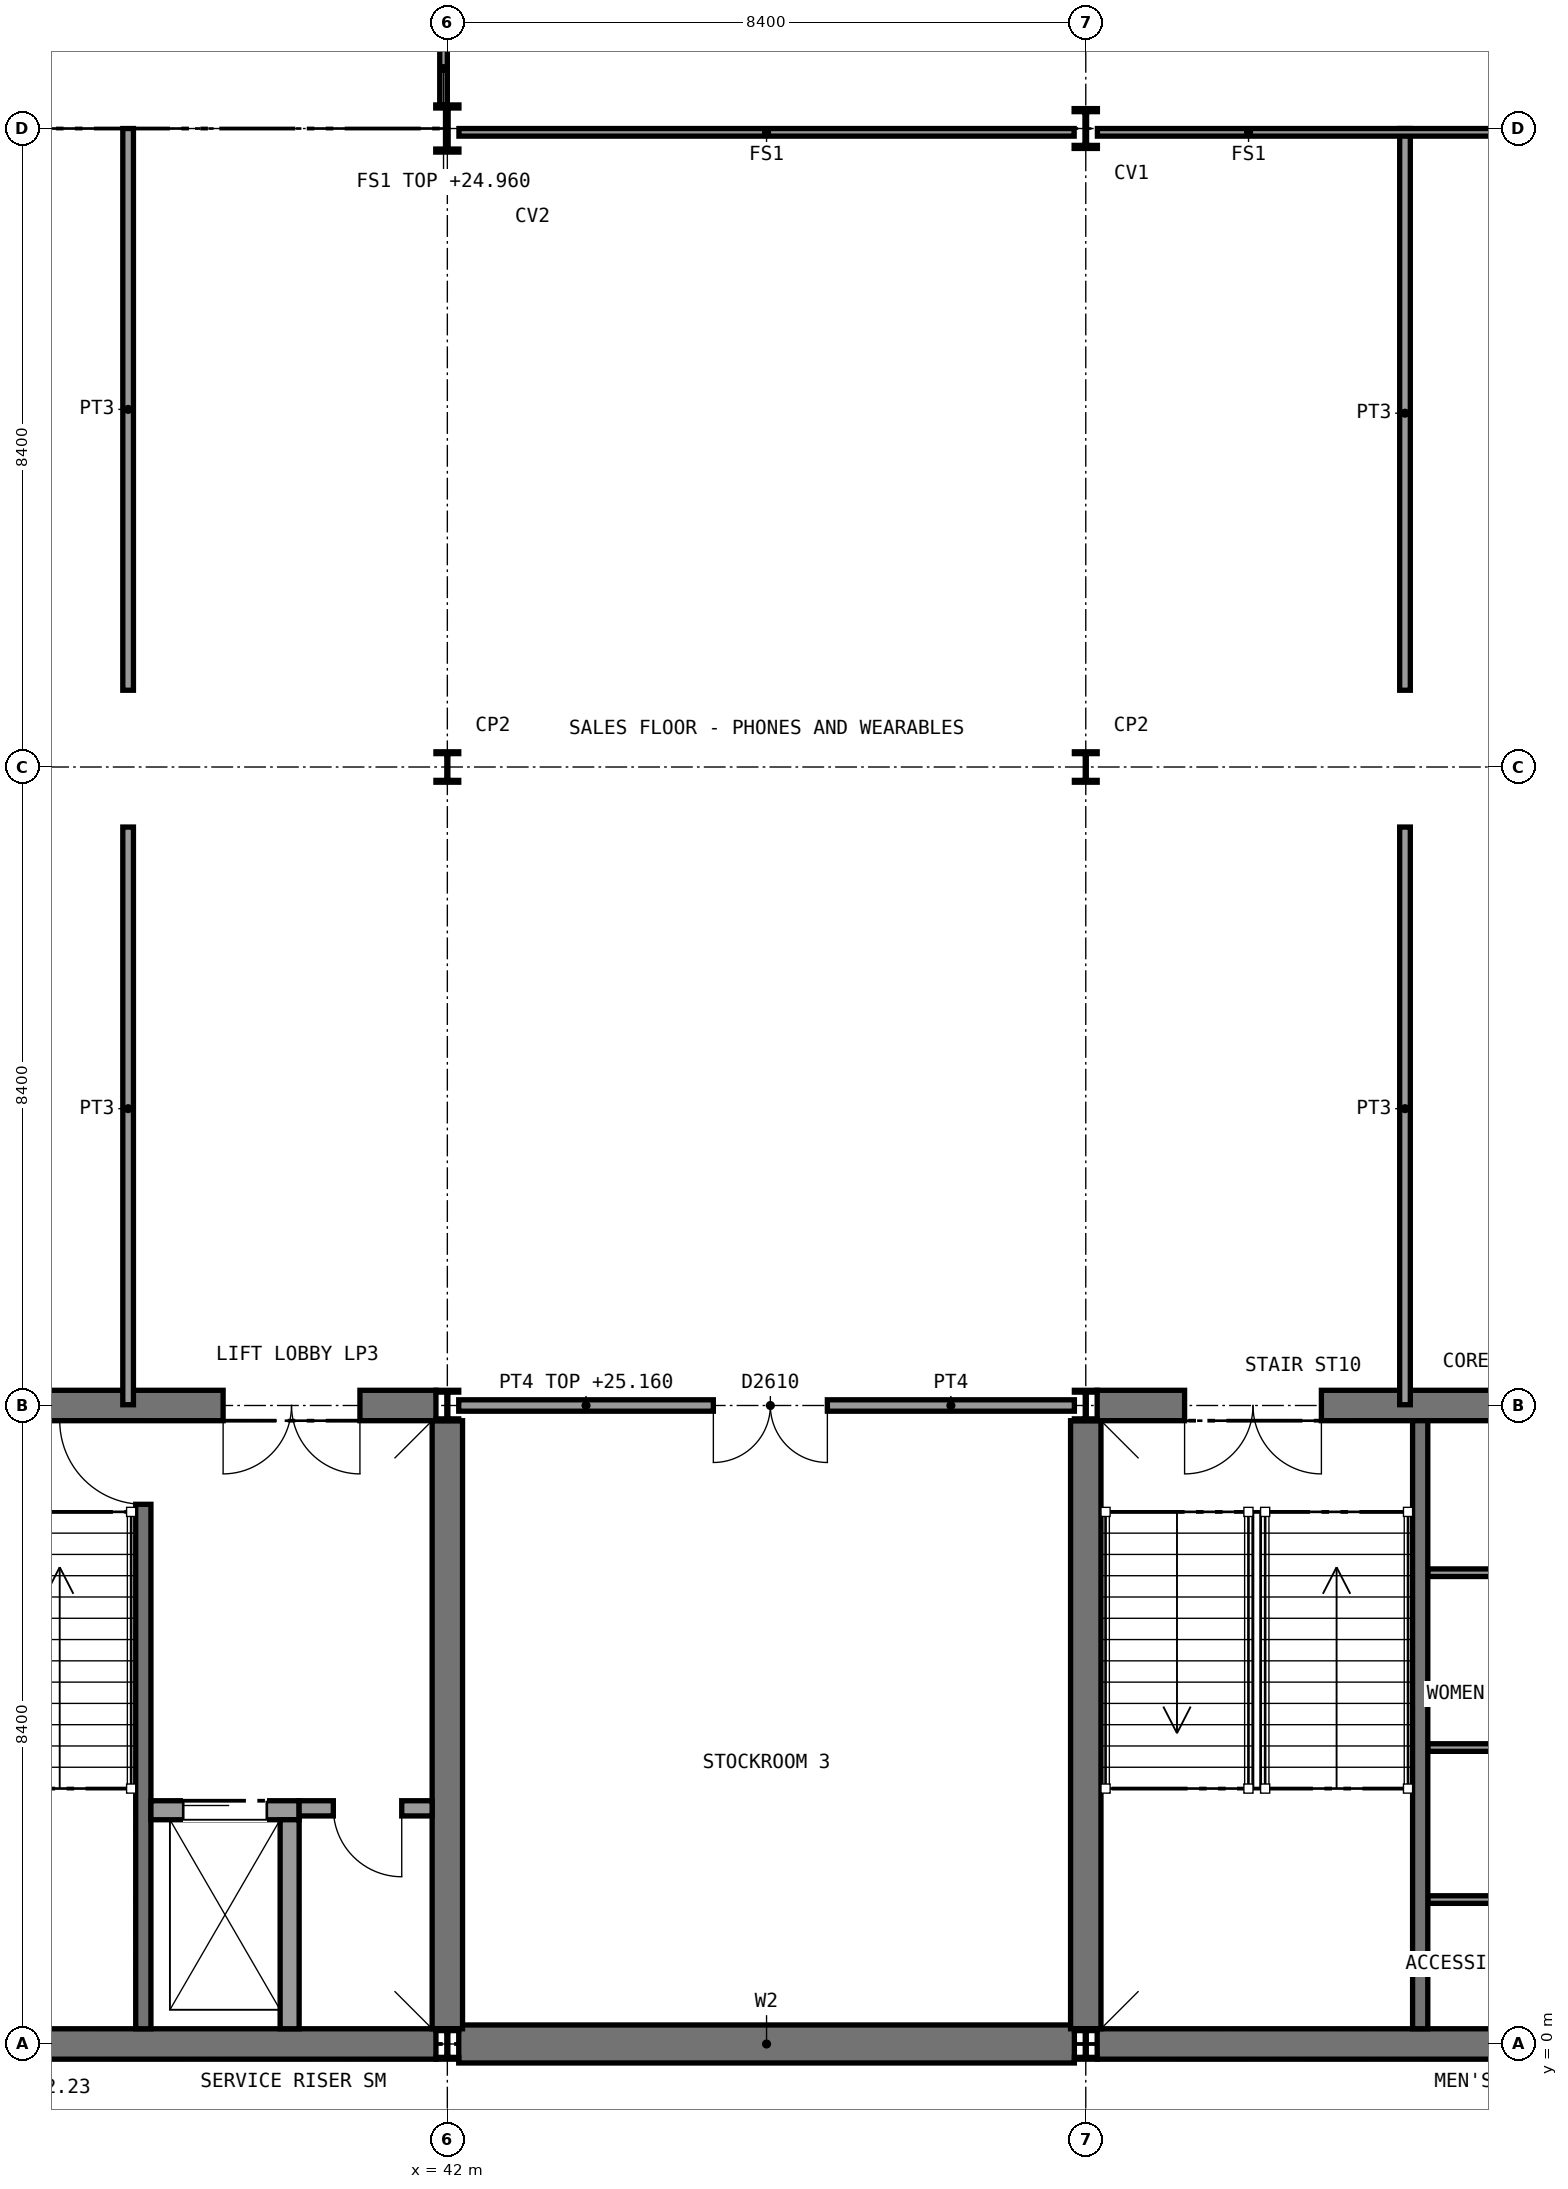
"""IFC4 building model, lengths in metres.
Left out: names, types, materials, properties, quantities, classifications, styles, units other than length and angle.
Written with IfcOpenShell. Run it as: python <this file> out.ifc"""

import sys

from ifc_helpers import new_model, si_unit, direction, frame, frame_2d, origin, origin_2d, place, context, subcontext, project, spatial, rectangle, i_section, extrude, element, fill, save


model = new_model("IFC4")
c1 = context("Model", 3, precision=1e-05, world=origin(), true_north=direction((0.0, 1.0)))
c2 = subcontext(c1, "Body", "Model", "MODEL_VIEW")
j1 = project(units=[si_unit("LENGTHUNIT", "METRE"), si_unit("PLANEANGLEUNIT", "RADIAN")], contexts=[c1])
p1 = place(None, origin())
s1 = spatial("IfcSite", under=j1, at=p1, CompositionType="ELEMENT")
p2 = place(p1, origin())
s2 = spatial("IfcBuilding", under=s1, at=p2, CompositionType="ELEMENT")
p3 = place(p2, frame((0.0, 0.0, 21.0)))
s3 = spatial("IfcBuildingStorey", under=s2, at=p3, CompositionType="ELEMENT", Elevation=21.0)
p4 = place(p3, frame((42.15, 0.0, 0.0), z_axis=(0.0, 0.0, 1.0), x_axis=(1.0, 0.0, 0.0)))
e1 = element("IfcWall", 1, at=p4, inside=s3, PredefinedType="SHEAR", context=c2, shape_type="SweptSolid", body=[
    extrude(rectangle(XDim=8.1, YDim=0.5, at=frame_2d((4.05, 0.0))), origin(), (0.0, 0.0, 1.0), 4.65),
])
p5 = place(p3, frame((33.75, 0.0, 0.0), z_axis=(0.0, 0.0, 1.0), x_axis=(1.0, 0.0, 0.0)))
e2 = element("IfcWall", 2, at=p5, inside=s3, PredefinedType="SHEAR", context=c2, shape_type="SweptSolid", body=[
    extrude(rectangle(XDim=8.1, YDim=0.4, at=frame_2d((4.05, 0.0))), origin(), (0.0, 0.0, 1.0), 4.65),
])
p6 = place(p3, frame((33.75, 8.4, 0.0), z_axis=(0.0, 0.0, 1.0), x_axis=(1.0, 0.0, 0.0)))
e3 = element("IfcWall", 3, at=p6, inside=s3, PredefinedType="SHEAR", context=c2, shape_type="SweptSolid", body=[
    extrude(rectangle(XDim=8.1, YDim=0.4, at=frame_2d((4.05, 0.0))), origin(), (0.0, 0.0, 1.0), 4.65),
])
p7 = place(p6, frame((1.15, 0.0, 0.0)))
e4 = element("IfcOpeningElement", 4, at=p7, cuts=e3, PredefinedType="OPENING", context=c2, shape_type="SweptSolid", body=[
    extrude(rectangle(XDim=1.8, YDim=2.1, at=frame_2d((0.9, 1.05))), frame((0.0, 0.21, 0.0), z_axis=(0.0, -1.0, 0.0), x_axis=(1.0, 0.0, 0.0)), (0.0, 0.0, 1.0), 0.42),
])
p8 = place(p6, frame((5.3, 0.0, 0.0)))
e5 = element("IfcOpeningElement", 5, at=p8, cuts=e3, PredefinedType="OPENING", context=c2, shape_type="SweptSolid", body=[
    extrude(rectangle(XDim=1.8, YDim=2.1, at=frame_2d((0.9, 1.05))), frame((0.0, 0.21, 0.0), z_axis=(0.0, -1.0, 0.0), x_axis=(1.0, 0.0, 0.0)), (0.0, 0.0, 1.0), 0.42),
])
p9 = place(p3, frame((42.0, 0.2, 0.0), z_axis=(0.0, 0.0, 1.0), x_axis=(0.0, 1.0, 0.0)))
e6 = element("IfcWall", 6, at=p9, inside=s3, PredefinedType="SHEAR", context=c2, shape_type="SweptSolid", body=[
    extrude(rectangle(XDim=8.0, YDim=0.4, at=frame_2d((4.0, 0.0))), origin(), (0.0, 0.0, 1.0), 4.65),
])
p10 = place(p3, frame((50.55, 0.0, 0.0), z_axis=(0.0, 0.0, 1.0), x_axis=(1.0, 0.0, 0.0)))
e7 = element("IfcWall", 7, at=p10, inside=s3, PredefinedType="SHEAR", context=c2, shape_type="SweptSolid", body=[
    extrude(rectangle(XDim=8.1, YDim=0.4, at=frame_2d((4.05, 0.0))), origin(), (0.0, 0.0, 1.0), 4.65),
])
p11 = place(p3, frame((50.55, 8.4, 0.0), z_axis=(0.0, 0.0, 1.0), x_axis=(1.0, 0.0, 0.0)))
e8 = element("IfcWall", 8, at=p11, inside=s3, PredefinedType="SHEAR", context=c2, shape_type="SweptSolid", body=[
    extrude(rectangle(XDim=8.1, YDim=0.4, at=frame_2d((4.05, 0.0))), origin(), (0.0, 0.0, 1.0), 4.65),
])
p12 = place(p11, frame((1.15, 0.0, 0.0)))
e9 = element("IfcOpeningElement", 9, at=p12, cuts=e8, PredefinedType="OPENING", context=c2, shape_type="SweptSolid", body=[
    extrude(rectangle(XDim=1.8, YDim=2.1, at=frame_2d((0.9, 1.05))), frame((0.0, 0.21, 0.0), z_axis=(0.0, -1.0, 0.0), x_axis=(1.0, 0.0, 0.0)), (0.0, 0.0, 1.0), 0.42),
])
p13 = place(p11, frame((5.6, 0.0, 0.0)))
e10 = element("IfcOpeningElement", 10, at=p13, cuts=e8, PredefinedType="OPENING", context=c2, shape_type="SweptSolid", body=[
    extrude(rectangle(XDim=1.2, YDim=2.1, at=frame_2d((0.6, 1.05))), frame((0.0, 0.21, 0.0), z_axis=(0.0, -1.0, 0.0), x_axis=(1.0, 0.0, 0.0)), (0.0, 0.0, 1.0), 0.42),
])
p14 = place(p3, frame((50.4, 0.2, 0.0), z_axis=(0.0, 0.0, 1.0), x_axis=(0.0, 1.0, 0.0)))
e11 = element("IfcWall", 11, at=p14, inside=s3, PredefinedType="SHEAR", context=c2, shape_type="SweptSolid", body=[
    extrude(rectangle(XDim=8.0, YDim=0.4, at=frame_2d((4.0, 0.0))), origin(), (0.0, 0.0, 1.0), 4.65),
])
for number, where, z_axis, x_axis in (
    (12, (42.0, 0.0, 0.0), (0.0, 0.0, 1.0), (1.0, 0.0, 0.0)),
    (13, (42.0, 8.4, 0.0), (0.0, 0.0, 1.0), (1.0, 0.0, 0.0)),
    (14, (42.0, 16.8, 0.0), (0.0, 0.0, 1.0), (1.0, 0.0, 0.0)),
):
    element("IfcColumn", number, at=place(p3, frame(where, z_axis=z_axis, x_axis=x_axis)), inside=s3, PredefinedType="COLUMN", context=c2, shape_type="SweptSolid", body=[
        extrude(i_section(OverallWidth=0.3, OverallDepth=0.4, WebThickness=0.013, FlangeThickness=0.024, FilletRadius=0.027, at=origin_2d()), origin(), (0.0, 0.0, 1.0), 4.8),
    ])
p15 = place(p3, frame((42.0, 25.2, 0.0), z_axis=(0.0, 0.0, 1.0), x_axis=(1.0, 0.0, 0.0)))
e15 = element("IfcColumn", 15, at=p15, inside=s3, PredefinedType="COLUMN", context=c2, shape_type="SweptSolid", body=[
    extrude(i_section(OverallWidth=0.305, OverallDepth=0.62, WebThickness=0.021, FlangeThickness=0.04, FilletRadius=0.027, at=origin_2d()), origin(), (0.0, 0.0, 1.0), 4.8),
])
for number, where, z_axis, x_axis in (
    (16, (50.4, 0.0, 0.0), (0.0, 0.0, 1.0), (1.0, 0.0, 0.0)),
    (17, (50.4, 8.4, 0.0), (0.0, 0.0, 1.0), (1.0, 0.0, 0.0)),
    (18, (50.4, 16.8, 0.0), (0.0, 0.0, 1.0), (1.0, 0.0, 0.0)),
):
    element("IfcColumn", number, at=place(p3, frame(where, z_axis=z_axis, x_axis=x_axis)), inside=s3, PredefinedType="COLUMN", context=c2, shape_type="SweptSolid", body=[
        extrude(i_section(OverallWidth=0.3, OverallDepth=0.4, WebThickness=0.013, FlangeThickness=0.024, FilletRadius=0.027, at=origin_2d()), origin(), (0.0, 0.0, 1.0), 4.8),
    ])
p16 = place(p3, frame((50.4, 25.2, 0.0), z_axis=(0.0, 0.0, 1.0), x_axis=(1.0, 0.0, 0.0)))
e19 = element("IfcColumn", 19, at=p16, inside=s3, PredefinedType="COLUMN", context=c2, shape_type="SweptSolid", body=[
    extrude(i_section(OverallWidth=0.306, OverallDepth=0.524, WebThickness=0.021, FlangeThickness=0.04, FilletRadius=0.027, at=origin_2d()), origin(), (0.0, 0.0, 1.0), 4.8),
])
p17 = place(p3, frame((54.9, 6.2, 0.0), z_axis=(0.0, 0.0, 1.0), x_axis=(1.0, 0.0, 0.0)))
e20 = element("IfcWall", 20, at=p17, inside=s3, PredefinedType="PARTITIONING", context=c2, shape_type="SweptSolid", body=[
    extrude(rectangle(XDim=2.4, YDim=0.1, at=frame_2d((1.2, 0.0))), origin(), (0.0, 0.0, 1.0), 4.58),
])
p18 = place(p17, frame((0.85, 0.0, 0.0)))
e21 = element("IfcOpeningElement", 21, at=p18, cuts=e20, PredefinedType="OPENING", context=c2, shape_type="SweptSolid", body=[
    extrude(rectangle(XDim=0.9, YDim=2.1, at=frame_2d((0.45, 1.05))), frame((0.0, 0.06, 0.0), z_axis=(0.0, -1.0, 0.0), x_axis=(1.0, 0.0, 0.0)), (0.0, 0.0, 1.0), 0.12),
])
for number, where, z_axis, x_axis in (
    (22, (54.9, 3.9, 0.0), (0.0, 0.0, 1.0), (1.0, 0.0, 0.0)),
    (23, (54.9, 1.9, 0.0), (0.0, 0.0, 1.0), (1.0, 0.0, 0.0)),
):
    element("IfcWall", number, at=place(p3, frame(where, z_axis=z_axis, x_axis=x_axis)), inside=s3, PredefinedType="PARTITIONING", context=c2, shape_type="SweptSolid", body=[
        extrude(rectangle(XDim=2.4, YDim=0.1, at=frame_2d((1.2, 0.0))), origin(), (0.0, 0.0, 1.0), 4.58),
    ])
p19 = place(p3, frame((42.15, 8.4, 0.0), z_axis=(0.0, 0.0, 1.0), x_axis=(1.0, 0.0, 0.0)))
e24 = element("IfcWall", 24, at=p19, inside=s3, PredefinedType="SOLIDWALL", context=c2, shape_type="SweptSolid", body=[
    extrude(rectangle(XDim=8.1, YDim=0.15, at=frame_2d((4.05, 0.0))), origin(), (0.0, 0.0, 1.0), 4.16),
])
p20 = place(p19, frame((3.35, 0.0, 0.0)))
e25 = element("IfcOpeningElement", 25, at=p20, cuts=e24, PredefinedType="OPENING", context=c2, shape_type="SweptSolid", body=[
    extrude(rectangle(XDim=1.5, YDim=2.1, at=frame_2d((0.75, 1.05))), frame((0.0, 0.085, 0.0), z_axis=(0.0, -1.0, 0.0), x_axis=(1.0, 0.0, 0.0)), (0.0, 0.0, 1.0), 0.17),
])
p21 = place(p3, frame((37.8, 8.41, 0.0), z_axis=(0.0, 0.0, 1.0), x_axis=(0.0, 1.0, 0.0)))
e26 = element("IfcWall", 26, at=p21, inside=s3, PredefinedType="PARTITIONING", context=c2, shape_type="SweptSolid", body=[
    extrude(rectangle(XDim=7.6, YDim=0.14, at=frame_2d((3.8, 0.0))), origin(), (0.0, 0.0, 1.0), 4.65),
])
p22 = place(p3, frame((37.8, 17.81, 0.0), z_axis=(0.0, 0.0, 1.0), x_axis=(0.0, 1.0, 0.0)))
e27 = element("IfcWall", 27, at=p22, inside=s3, PredefinedType="PARTITIONING", context=c2, shape_type="SweptSolid", body=[
    extrude(rectangle(XDim=7.39, YDim=0.14, at=frame_2d((3.695, 0.0))), origin(), (0.0, 0.0, 1.0), 4.65),
])
p23 = place(p3, frame((54.6, 8.41, 0.0), z_axis=(0.0, 0.0, 1.0), x_axis=(0.0, 1.0, 0.0)))
e28 = element("IfcWall", 28, at=p23, inside=s3, PredefinedType="PARTITIONING", context=c2, shape_type="SweptSolid", body=[
    extrude(rectangle(XDim=7.6, YDim=0.14, at=frame_2d((3.8, 0.0))), origin(), (0.0, 0.0, 1.0), 4.65),
])
p24 = place(p3, frame((54.6, 17.81, 0.0), z_axis=(0.0, 0.0, 1.0), x_axis=(0.0, 1.0, 0.0)))
e29 = element("IfcWall", 29, at=p24, inside=s3, PredefinedType="PARTITIONING", context=c2, shape_type="SweptSolid", body=[
    extrude(rectangle(XDim=7.39, YDim=0.14, at=frame_2d((3.695, 0.0))), origin(), (0.0, 0.0, 1.0), 4.65),
])
p25 = place(p3, frame((38.0, 0.2, 0.0), z_axis=(0.0, 0.0, 1.0), x_axis=(0.0, 1.0, 0.0)))
e30 = element("IfcWall", 30, at=p25, inside=s3, PredefinedType="SHEAR", context=c2, shape_type="SweptSolid", body=[
    extrude(rectangle(XDim=8.0, YDim=0.2, at=frame_2d((4.0, 0.0))), origin(), (0.0, 0.0, 1.0), 4.65),
])
p26 = place(p25, frame((6.9, 0.0, 0.0)))
e31 = element("IfcOpeningElement", 31, at=p26, cuts=e30, PredefinedType="OPENING", context=c2, shape_type="SweptSolid", body=[
    extrude(rectangle(XDim=1.11, YDim=2.1, at=frame_2d((0.555, 1.05))), frame((0.0, 0.11, 0.0), z_axis=(0.0, -1.0, 0.0), x_axis=(1.0, 0.0, 0.0)), (0.0, 0.0, 1.0), 0.22),
])
p27 = place(p3, frame((38.1, 3.075, 0.0), z_axis=(0.0, 0.0, 1.0), x_axis=(1.0, 0.0, 0.0)))
e32 = element("IfcWall", 32, at=p27, inside=s3, PredefinedType="SOLIDWALL", context=c2, shape_type="SweptSolid", body=[
    extrude(rectangle(XDim=1.95, YDim=0.25, at=frame_2d((0.975, 0.0))), origin(), (0.0, 0.0, 1.0), 4.8),
])
p28 = place(p27, frame((0.425, 0.0, 0.0)))
e33 = element("IfcOpeningElement", 33, at=p28, cuts=e32, PredefinedType="OPENING", context=c2, shape_type="SweptSolid", body=[
    extrude(rectangle(XDim=1.1, YDim=2.1, at=frame_2d((0.55, 1.05))), frame((0.0, 0.135, 0.0), z_axis=(0.0, -1.0, 0.0), x_axis=(1.0, 0.0, 0.0)), (0.0, 0.0, 1.0), 0.27),
])
p29 = place(p3, frame((39.925, 0.2, 0.0), z_axis=(0.0, 0.0, 1.0), x_axis=(0.0, 1.0, 0.0)))
e34 = element("IfcWall", 34, at=p29, inside=s3, PredefinedType="SOLIDWALL", context=c2, shape_type="SweptSolid", body=[
    extrude(rectangle(XDim=2.75, YDim=0.25, at=frame_2d((1.375, 0.0))), origin(), (0.0, 0.0, 1.0), 4.8),
])
p30 = place(p3, frame((40.05, 3.1, 0.0), z_axis=(0.0, 0.0, 1.0), x_axis=(1.0, 0.0, 0.0)))
e35 = element("IfcWall", 35, at=p30, inside=s3, PredefinedType="PARTITIONING", context=c2, shape_type="SweptSolid", body=[
    extrude(rectangle(XDim=1.75, YDim=0.2, at=frame_2d((0.875, 0.0))), origin(), (0.0, 0.0, 1.0), 4.65),
])
p31 = place(p30, frame((0.45, 0.0, 0.0)))
e36 = element("IfcOpeningElement", 36, at=p31, cuts=e35, PredefinedType="OPENING", context=c2, shape_type="SweptSolid", body=[
    extrude(rectangle(XDim=0.9, YDim=2.1, at=frame_2d((0.45, 1.05))), frame((0.0, 0.11, 0.0), z_axis=(0.0, -1.0, 0.0), x_axis=(1.0, 0.0, 0.0)), (0.0, 0.0, 1.0), 0.22),
])
p32 = place(p3, frame((54.8, 0.2, 0.0), z_axis=(0.0, 0.0, 1.0), x_axis=(0.0, 1.0, 0.0)))
e37 = element("IfcWall", 37, at=p32, inside=s3, PredefinedType="SHEAR", context=c2, shape_type="SweptSolid", body=[
    extrude(rectangle(XDim=8.0, YDim=0.2, at=frame_2d((4.0, 0.0))), origin(), (0.0, 0.0, 1.0), 4.65),
])
p33 = place(p3, frame((42.153, 25.15, 0.0), z_axis=(0.0, 0.0, 1.0), x_axis=(1.0, 0.0, 0.0)))
e38 = element("IfcWall", 38, at=p33, inside=s3, PredefinedType="PARTITIONING", context=c2, shape_type="SweptSolid", body=[
    extrude(rectangle(XDim=8.094, YDim=0.1, at=frame_2d((4.047, 0.0))), origin(), (0.0, 0.0, 1.0), 4.11),
])
p34 = place(p3, frame((50.553, 25.15, 0.0), z_axis=(0.0, 0.0, 1.0), x_axis=(1.0, 0.0, 0.0)))
e39 = element("IfcWall", 39, at=p34, inside=s3, PredefinedType="PARTITIONING", context=c2, shape_type="SweptSolid", body=[
    extrude(rectangle(XDim=8.094, YDim=0.1, at=frame_2d((4.047, 0.0))), origin(), (0.0, 0.0, 1.0), 4.11),
])
p35 = place(p3, frame((41.95, 25.51, 0.0), z_axis=(0.0, 0.0, 1.0), x_axis=(0.0, 1.0, 0.0)))
e40 = element("IfcWall", 40, at=p35, inside=s3, PredefinedType="PARTITIONING", context=c2, shape_type="SweptSolid", body=[
    extrude(rectangle(XDim=11.98, YDim=0.1, at=frame_2d((5.99, 0.0))), origin(), (0.0, 0.0, 1.0), 3.96),
])
p36 = place(p20, frame((1.5, 0.0, 0.0), z_axis=(0.0, 0.0, 1.0), x_axis=(-1.0, 0.0, 0.0)))
e41 = element("IfcDoor", 41, at=p36, inside=s3, OperationType="DOUBLE_DOOR_SINGLE_SWING", PredefinedType="DOOR", context=c2, shape_type="SweptSolid", body=[
    extrude(rectangle(XDim=1.5, YDim=2.1, at=frame_2d((0.75, 1.05))), frame((0.0, 0.025, 0.0), z_axis=(0.0, -1.0, 0.0), x_axis=(1.0, 0.0, 0.0)), (0.0, 0.0, 1.0), 0.05),
])
fill(e25, e41)
p37 = place(p26, origin())
e42 = element("IfcDoor", 42, at=p37, inside=s3, OperationType="SINGLE_SWING_RIGHT", PredefinedType="DOOR", context=c2, shape_type="SweptSolid", body=[
    extrude(rectangle(XDim=1.1, YDim=2.1, at=frame_2d((0.55, 1.05))), frame((0.0, 0.025, 0.0), z_axis=(0.0, -1.0, 0.0), x_axis=(1.0, 0.0, 0.0)), (0.0, 0.0, 1.0), 0.05),
])
fill(e31, e42)
p38 = place(p28, origin())
e43 = element("IfcDoor", 43, at=p38, inside=s3, OperationType="SLIDING_TO_LEFT", PredefinedType="DOOR", context=c2, shape_type="SweptSolid", body=[
    extrude(rectangle(XDim=1.1, YDim=2.1, at=frame_2d((0.55, 1.05))), frame((0.0, 0.025, 0.0), z_axis=(0.0, -1.0, 0.0), x_axis=(1.0, 0.0, 0.0)), (0.0, 0.0, 1.0), 0.05),
])
fill(e33, e43)
p39 = place(p31, frame((0.9, 0.0, 0.0), z_axis=(0.0, 0.0, 1.0), x_axis=(-1.0, 0.0, 0.0)))
e44 = element("IfcDoor", 44, at=p39, inside=s3, OperationType="SINGLE_SWING_LEFT", PredefinedType="DOOR", context=c2, shape_type="SweptSolid", body=[
    extrude(rectangle(XDim=0.9, YDim=2.1, at=frame_2d((0.45, 1.05))), frame((0.0, 0.025, 0.0), z_axis=(0.0, -1.0, 0.0), x_axis=(1.0, 0.0, 0.0)), (0.0, 0.0, 1.0), 0.05),
])
fill(e36, e44)
p40 = place(p8, frame((1.8, 0.0, 0.0), z_axis=(0.0, 0.0, 1.0), x_axis=(-1.0, 0.0, 0.0)))
e45 = element("IfcDoor", 45, at=p40, inside=s3, OperationType="DOUBLE_DOOR_SINGLE_SWING", PredefinedType="DOOR", context=c2, shape_type="SweptSolid", body=[
    extrude(rectangle(XDim=1.8, YDim=2.1, at=frame_2d((0.9, 1.05))), frame((0.0, 0.025, 0.0), z_axis=(0.0, -1.0, 0.0), x_axis=(1.0, 0.0, 0.0)), (0.0, 0.0, 1.0), 0.05),
])
fill(e5, e45)
p41 = place(p12, frame((1.8, 0.0, 0.0), z_axis=(0.0, 0.0, 1.0), x_axis=(-1.0, 0.0, 0.0)))
e46 = element("IfcDoor", 46, at=p41, inside=s3, OperationType="DOUBLE_DOOR_SINGLE_SWING", PredefinedType="DOOR", context=c2, shape_type="SweptSolid", body=[
    extrude(rectangle(XDim=1.8, YDim=2.1, at=frame_2d((0.9, 1.05))), frame((0.0, 0.025, 0.0), z_axis=(0.0, -1.0, 0.0), x_axis=(1.0, 0.0, 0.0)), (0.0, 0.0, 1.0), 0.05),
])
fill(e9, e46)
save(model, sys.argv[1])
